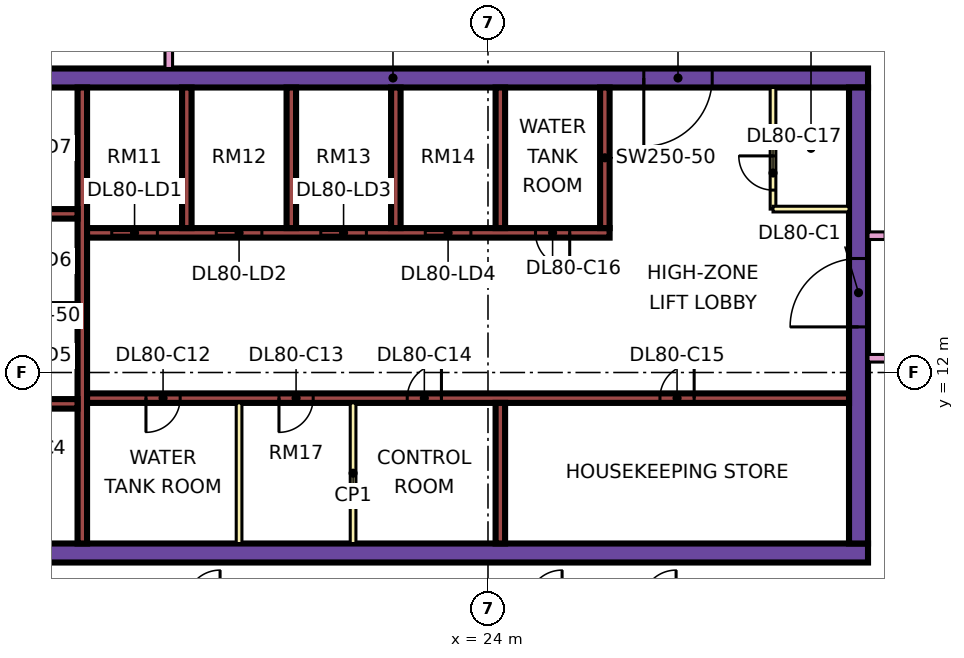
"""IFC4 building model, lengths in metres.
Left out: names, types, materials, properties, quantities, classifications, styles, units other than length and angle.
Written with IfcOpenShell. Run it as: python <this file> out.ifc"""

import sys

from ifc_helpers import new_model, si_unit, direction, frame, frame_2d, origin, place, context, subcontext, project, spatial, rectangle, extrude, element, fill, save


model = new_model("IFC4")
c1 = context("Model", 3, precision=1e-05, world=origin(), true_north=direction((0.0, 1.0)))
c2 = subcontext(c1, "Body", "Model", "MODEL_VIEW")
j1 = project(units=[si_unit("LENGTHUNIT", "METRE"), si_unit("PLANEANGLEUNIT", "RADIAN")], contexts=[c1])
p1 = place(None, origin())
s1 = spatial("IfcSite", under=j1, at=p1, CompositionType="ELEMENT")
p2 = place(p1, origin())
s2 = spatial("IfcBuilding", under=s1, at=p2, CompositionType="ELEMENT")
p3 = place(p2, frame((0.0, 0.0, 346.4)))
s3 = spatial("IfcBuildingStorey", under=s2, at=p3, CompositionType="ELEMENT", Elevation=346.4)
p4 = place(p3, frame((9.0, 7.25, 0.0), z_axis=(0.0, 0.0, 1.0), x_axis=(1.0, 0.0, 0.0)))
e1 = element("IfcWall", 1, at=p4, inside=s3, PredefinedType="SHEAR", context=c2, shape_type="SweptSolid", body=[
    extrude(rectangle(XDim=25.0, YDim=0.5, at=frame_2d((12.5, 0.0))), origin(), (0.0, 0.0, 1.0), 3.75),
])
p5 = place(p3, frame((9.0, 19.75, 0.0), z_axis=(0.0, 0.0, 1.0), x_axis=(1.0, 0.0, 0.0)))
e2 = element("IfcWall", 2, at=p5, inside=s3, PredefinedType="SHEAR", context=c2, shape_type="SweptSolid", body=[
    extrude(rectangle(XDim=25.0, YDim=0.5, at=frame_2d((12.5, 0.0))), origin(), (0.0, 0.0, 1.0), 3.75),
])
p6 = place(p5, frame((19.1, 0.0, 0.0)))
e3 = element("IfcOpeningElement", 3, at=p6, cuts=e2, PredefinedType="OPENING", context=c2, shape_type="SweptSolid", body=[
    extrude(rectangle(XDim=1.8, YDim=2.4, at=frame_2d((0.9, 1.2))), frame((0.0, 0.26, 0.0), z_axis=(0.0, -1.0, 0.0), x_axis=(1.0, 0.0, 0.0)), (0.0, 0.0, 1.0), 0.52),
])
p7 = place(p3, frame((33.75, 7.5, 0.0), z_axis=(0.0, 0.0, 1.0), x_axis=(0.0, 1.0, 0.0)))
e4 = element("IfcWall", 4, at=p7, inside=s3, PredefinedType="SHEAR", context=c2, shape_type="SweptSolid", body=[
    extrude(rectangle(XDim=12.0, YDim=0.5, at=frame_2d((6.0, 0.0))), origin(), (0.0, 0.0, 1.0), 3.75),
])
p8 = place(p7, frame((5.7, 0.0, 0.0)))
e5 = element("IfcOpeningElement", 5, at=p8, cuts=e4, PredefinedType="OPENING", context=c2, shape_type="SweptSolid", body=[
    extrude(rectangle(XDim=1.8, YDim=2.4, at=frame_2d((0.9, 1.2))), frame((0.0, 0.26, 0.0), z_axis=(0.0, -1.0, 0.0), x_axis=(1.0, 0.0, 0.0)), (0.0, 0.0, 1.0), 0.52),
])
p9 = place(p3, frame((13.325, 7.5, 0.0), z_axis=(0.0, 0.0, 1.0), x_axis=(0.0, 1.0, 0.0)))
e6 = element("IfcWall", 6, at=p9, inside=s3, PredefinedType="SHEAR", context=c2, shape_type="SweptSolid", body=[
    extrude(rectangle(XDim=12.0, YDim=0.25, at=frame_2d((6.0, 0.0))), origin(), (0.0, 0.0, 1.0), 3.75),
])
p10 = place(p3, frame((13.45, 11.325, 0.0), z_axis=(0.0, 0.0, 1.0), x_axis=(1.0, 0.0, 0.0)))
e7 = element("IfcWall", 7, at=p10, inside=s3, PredefinedType="SHEAR", context=c2, shape_type="SweptSolid", body=[
    extrude(rectangle(XDim=20.05, YDim=0.25, at=frame_2d((10.025, 0.0))), origin(), (0.0, 0.0, 1.0), 3.75),
])
p11 = place(p10, frame((1.55, 0.0, 0.0)))
e8 = element("IfcOpeningElement", 8, at=p11, cuts=e7, PredefinedType="OPENING", context=c2, shape_type="SweptSolid", body=[
    extrude(rectangle(XDim=0.9, YDim=2.1, at=frame_2d((0.45, 1.05))), frame((0.0, 0.135, 0.0), z_axis=(0.0, -1.0, 0.0), x_axis=(1.0, 0.0, 0.0)), (0.0, 0.0, 1.0), 0.27),
])
p12 = place(p10, frame((5.05, 0.0, 0.0)))
e9 = element("IfcOpeningElement", 9, at=p12, cuts=e7, PredefinedType="OPENING", context=c2, shape_type="SweptSolid", body=[
    extrude(rectangle(XDim=0.9, YDim=2.1, at=frame_2d((0.45, 1.05))), frame((0.0, 0.135, 0.0), z_axis=(0.0, -1.0, 0.0), x_axis=(1.0, 0.0, 0.0)), (0.0, 0.0, 1.0), 0.27),
])
p13 = place(p10, frame((8.425, 0.0, 0.0)))
e10 = element("IfcOpeningElement", 10, at=p13, cuts=e7, PredefinedType="OPENING", context=c2, shape_type="SweptSolid", body=[
    extrude(rectangle(XDim=0.9, YDim=2.1, at=frame_2d((0.45, 1.05))), frame((0.0, 0.135, 0.0), z_axis=(0.0, -1.0, 0.0), x_axis=(1.0, 0.0, 0.0)), (0.0, 0.0, 1.0), 0.27),
])
p14 = place(p10, frame((15.075, 0.0, 0.0)))
e11 = element("IfcOpeningElement", 11, at=p14, cuts=e7, PredefinedType="OPENING", context=c2, shape_type="SweptSolid", body=[
    extrude(rectangle(XDim=0.9, YDim=2.1, at=frame_2d((0.45, 1.05))), frame((0.0, 0.135, 0.0), z_axis=(0.0, -1.0, 0.0), x_axis=(1.0, 0.0, 0.0)), (0.0, 0.0, 1.0), 0.27),
])
p15 = place(p3, frame((13.45, 15.675, 0.0), z_axis=(0.0, 0.0, 1.0), x_axis=(1.0, 0.0, 0.0)))
e12 = element("IfcWall", 12, at=p15, inside=s3, PredefinedType="SHEAR", context=c2, shape_type="SweptSolid", body=[
    extrude(rectangle(XDim=13.75, YDim=0.25, at=frame_2d((6.875, 0.0))), origin(), (0.0, 0.0, 1.0), 3.75),
])
p16 = place(p15, frame((0.65, 0.0, 0.0)))
e13 = element("IfcOpeningElement", 13, at=p16, cuts=e12, PredefinedType="OPENING", context=c2, shape_type="SweptSolid", body=[
    extrude(rectangle(XDim=1.2, YDim=2.2, at=frame_2d((0.6, 1.1))), frame((0.0, 0.135, 0.0), z_axis=(0.0, -1.0, 0.0), x_axis=(1.0, 0.0, 0.0)), (0.0, 0.0, 1.0), 0.27),
])
p17 = place(p15, frame((3.4, 0.0, 0.0)))
e14 = element("IfcOpeningElement", 14, at=p17, cuts=e12, PredefinedType="OPENING", context=c2, shape_type="SweptSolid", body=[
    extrude(rectangle(XDim=1.2, YDim=2.2, at=frame_2d((0.6, 1.1))), frame((0.0, 0.135, 0.0), z_axis=(0.0, -1.0, 0.0), x_axis=(1.0, 0.0, 0.0)), (0.0, 0.0, 1.0), 0.27),
])
p18 = place(p15, frame((6.15, 0.0, 0.0)))
e15 = element("IfcOpeningElement", 15, at=p18, cuts=e12, PredefinedType="OPENING", context=c2, shape_type="SweptSolid", body=[
    extrude(rectangle(XDim=1.2, YDim=2.2, at=frame_2d((0.6, 1.1))), frame((0.0, 0.135, 0.0), z_axis=(0.0, -1.0, 0.0), x_axis=(1.0, 0.0, 0.0)), (0.0, 0.0, 1.0), 0.27),
])
p19 = place(p15, frame((8.9, 0.0, 0.0)))
e16 = element("IfcOpeningElement", 16, at=p19, cuts=e12, PredefinedType="OPENING", context=c2, shape_type="SweptSolid", body=[
    extrude(rectangle(XDim=1.2, YDim=2.2, at=frame_2d((0.6, 1.1))), frame((0.0, 0.135, 0.0), z_axis=(0.0, -1.0, 0.0), x_axis=(1.0, 0.0, 0.0)), (0.0, 0.0, 1.0), 0.27),
])
p20 = place(p15, frame((11.8, 0.0, 0.0)))
e17 = element("IfcOpeningElement", 17, at=p20, cuts=e12, PredefinedType="OPENING", context=c2, shape_type="SweptSolid", body=[
    extrude(rectangle(XDim=0.9, YDim=2.1, at=frame_2d((0.45, 1.05))), frame((0.0, 0.135, 0.0), z_axis=(0.0, -1.0, 0.0), x_axis=(1.0, 0.0, 0.0)), (0.0, 0.0, 1.0), 0.27),
])
for number, where, z_axis, x_axis in (
    (18, (10.2, 11.175, 0.0), (0.0, 0.0, 1.0), (1.0, 0.0, 0.0)),
    (19, (10.2, 13.675, 0.0), (0.0, 0.0, 1.0), (1.0, 0.0, 0.0)),
    (20, (10.2, 16.175, 0.0), (0.0, 0.0, 1.0), (1.0, 0.0, 0.0)),
):
    element("IfcWall", number, at=place(p3, frame(where, z_axis=z_axis, x_axis=x_axis)), inside=s3, PredefinedType="SHEAR", context=c2, shape_type="SweptSolid", body=[
        extrude(rectangle(XDim=3.0, YDim=0.25, at=frame_2d((1.5, 0.0))), origin(), (0.0, 0.0, 1.0), 3.75),
    ])
for number, where, z_axis, x_axis in (
    (21, (24.325, 7.5, 0.0), (0.0, 0.0, 1.0), (0.0, 1.0, 0.0)),
    (22, (16.075, 15.8, 0.0), (0.0, 0.0, 1.0), (0.0, 1.0, 0.0)),
    (23, (18.825, 15.8, 0.0), (0.0, 0.0, 1.0), (0.0, 1.0, 0.0)),
    (24, (21.575, 15.8, 0.0), (0.0, 0.0, 1.0), (0.0, 1.0, 0.0)),
    (25, (24.325, 15.8, 0.0), (0.0, 0.0, 1.0), (0.0, 1.0, 0.0)),
    (26, (27.075, 15.8, 0.0), (0.0, 0.0, 1.0), (0.0, 1.0, 0.0)),
):
    element("IfcWall", number, at=place(p3, frame(where, z_axis=z_axis, x_axis=x_axis)), inside=s3, PredefinedType="SHEAR", context=c2, shape_type="SweptSolid", body=[
        extrude(rectangle(XDim=3.7, YDim=0.25, at=frame_2d((1.85, 0.0))), origin(), (0.0, 0.0, 1.0), 3.75),
    ])
p21 = place(p3, frame((-1.447, 12.553, 0.0), z_axis=(0.0, 0.0, 1.0), x_axis=(0.707106781187, -0.707106781187, 0.0)))
e27 = element("IfcWall", 27, at=p21, inside=s3, PredefinedType="SOLIDWALL", context=c2, shape_type="SweptSolid", body=[
    extrude(rectangle(XDim=19.799, YDim=0.15, at=frame_2d((9.899, 0.0))), origin(), (0.0, 0.0, 1.0), 3.35),
])
p22 = place(p21, frame((2.212, 0.0, 0.45)))
e28 = element("IfcOpeningElement", 28, at=p22, cuts=e27, PredefinedType="OPENING", context=c2, shape_type="SweptSolid", body=[
    extrude(rectangle(XDim=3.0, YDim=2.4, at=frame_2d((1.5, 1.2))), frame((0.0, 0.085, 0.0), z_axis=(0.0, -1.0, 0.0), x_axis=(1.0, 0.0, 0.0)), (0.0, 0.0, 1.0), 0.17),
])
p23 = place(p21, frame((10.216, 0.0, 0.45)))
e29 = element("IfcOpeningElement", 29, at=p23, cuts=e27, PredefinedType="OPENING", context=c2, shape_type="SweptSolid", body=[
    extrude(rectangle(XDim=3.0, YDim=2.4, at=frame_2d((1.5, 1.2))), frame((0.0, 0.085, 0.0), z_axis=(0.0, -1.0, 0.0), x_axis=(1.0, 0.0, 0.0)), (0.0, 0.0, 1.0), 0.17),
])
for number, where, z_axis, x_axis in (
    (30, (17.45, 7.5, 0.0), (0.0, 0.0, 1.0), (0.0, 1.0, 0.0)),
    (31, (20.45, 7.5, 0.0), (0.0, 0.0, 1.0), (0.0, 1.0, 0.0)),
):
    element("IfcWall", number, at=place(p3, frame(where, z_axis=z_axis, x_axis=x_axis)), inside=s3, PredefinedType="PARTITIONING", context=c2, shape_type="SweptSolid", body=[
        extrude(rectangle(XDim=3.7, YDim=0.15, at=frame_2d((1.85, 0.0))), origin(), (0.0, 0.0, 1.0), 3.35),
    ])
p24 = place(p3, frame((31.5, 16.3, 0.0), z_axis=(0.0, 0.0, 1.0), x_axis=(0.0, 1.0, 0.0)))
e32 = element("IfcWall", 32, at=p24, inside=s3, PredefinedType="PARTITIONING", context=c2, shape_type="SweptSolid", body=[
    extrude(rectangle(XDim=3.2, YDim=0.15, at=frame_2d((1.6, 0.0))), origin(), (0.0, 0.0, 1.0), 3.35),
])
p25 = place(p24, frame((0.5, 0.0, 0.0)))
e33 = element("IfcOpeningElement", 33, at=p25, cuts=e32, PredefinedType="OPENING", context=c2, shape_type="SweptSolid", body=[
    extrude(rectangle(XDim=0.9, YDim=2.1, at=frame_2d((0.45, 1.05))), frame((0.0, 0.085, 0.0), z_axis=(0.0, -1.0, 0.0), x_axis=(1.0, 0.0, 0.0)), (0.0, 0.0, 1.0), 0.17),
])
p26 = place(p3, frame((31.5, 16.3, 0.0), z_axis=(0.0, 0.0, 1.0), x_axis=(1.0, 0.0, 0.0)))
e34 = element("IfcWall", 34, at=p26, inside=s3, PredefinedType="PARTITIONING", context=c2, shape_type="SweptSolid", body=[
    extrude(rectangle(XDim=2.0, YDim=0.15, at=frame_2d((1.0, 0.0))), origin(), (0.0, 0.0, 1.0), 3.35),
])
p27 = place(p3, frame((15.6, 20.0, 0.0), z_axis=(0.0, 0.0, 1.0), x_axis=(0.0, 1.0, 0.0)))
e35 = element("IfcWall", 35, at=p27, inside=s3, PredefinedType="PARTITIONING", context=c2, shape_type="SweptSolid", body=[
    extrude(rectangle(XDim=27.775, YDim=0.2, at=frame_2d((13.887, 0.0))), origin(), (0.0, 0.0, 1.0), 3.35),
])
p28 = place(p27, frame((6.7, 0.0, 0.0)))
e36 = element("IfcOpeningElement", 36, at=p28, cuts=e35, PredefinedType="OPENING", context=c2, shape_type="SweptSolid", body=[
    extrude(rectangle(XDim=1.6, YDim=2.1, at=frame_2d((0.8, 1.05))), frame((0.0, 0.11, 0.0), z_axis=(0.0, -1.0, 0.0), x_axis=(1.0, 0.0, 0.0)), (0.0, 0.0, 1.0), 0.22),
])
p29 = place(p27, frame((12.95, 0.0, 0.0)))
e37 = element("IfcOpeningElement", 37, at=p29, cuts=e35, PredefinedType="OPENING", context=c2, shape_type="SweptSolid", body=[
    extrude(rectangle(XDim=1.0, YDim=2.1, at=frame_2d((0.5, 1.05))), frame((0.0, 0.11, 0.0), z_axis=(0.0, -1.0, 0.0), x_axis=(1.0, 0.0, 0.0)), (0.0, 0.0, 1.0), 0.22),
])
p30 = place(p27, frame((16.9, 0.0, 0.0)))
e38 = element("IfcOpeningElement", 38, at=p30, cuts=e35, PredefinedType="OPENING", context=c2, shape_type="SweptSolid", body=[
    extrude(rectangle(XDim=1.0, YDim=2.1, at=frame_2d((0.5, 1.05))), frame((0.0, 0.11, 0.0), z_axis=(0.0, -1.0, 0.0), x_axis=(1.0, 0.0, 0.0)), (0.0, 0.0, 1.0), 0.22),
])
p31 = place(p27, frame((1.15, 0.0, 0.0)))
e39 = element("IfcOpeningElement", 39, at=p31, cuts=e35, PredefinedType="OPENING", context=c2, shape_type="SweptSolid", body=[
    extrude(rectangle(XDim=1.8, YDim=2.1, at=frame_2d((0.9, 1.05))), frame((0.0, 0.11, 0.0), z_axis=(0.0, -1.0, 0.0), x_axis=(1.0, 0.0, 0.0)), (0.0, 0.0, 1.0), 0.22),
])
p32 = place(p27, frame((25.9, 0.0, 0.0)))
e40 = element("IfcOpeningElement", 40, at=p32, cuts=e35, PredefinedType="OPENING", context=c2, shape_type="SweptSolid", body=[
    extrude(rectangle(XDim=1.0, YDim=2.1, at=frame_2d((0.5, 1.05))), frame((0.0, 0.11, 0.0), z_axis=(0.0, -1.0, 0.0), x_axis=(1.0, 0.0, 0.0)), (0.0, 0.0, 1.0), 0.22),
])
p33 = place(p3, frame((34.0, 12.375, 0.0), z_axis=(0.0, 0.0, 1.0), x_axis=(1.0, 0.0, 0.0)))
e41 = element("IfcWall", 41, at=p33, inside=s3, PredefinedType="PARTITIONING", context=c2, shape_type="SweptSolid", body=[
    extrude(rectangle(XDim=2.376, YDim=0.2, at=frame_2d((1.188, 0.0))), origin(), (0.0, 0.0, 1.0), 3.35),
])
p34 = place(p3, frame((34.0, 15.6, 0.0), z_axis=(0.0, 0.0, 1.0), x_axis=(1.0, 0.0, 0.0)))
e42 = element("IfcWall", 42, at=p34, inside=s3, PredefinedType="PARTITIONING", context=c2, shape_type="SweptSolid", body=[
    extrude(rectangle(XDim=10.35, YDim=0.2, at=frame_2d((5.175, 0.0))), origin(), (0.0, 0.0, 1.0), 3.35),
])
p35 = place(p34, frame((5.6, 0.0, 0.0)))
e43 = element("IfcOpeningElement", 43, at=p35, cuts=e42, PredefinedType="OPENING", context=c2, shape_type="SweptSolid", body=[
    extrude(rectangle(XDim=1.0, YDim=2.1, at=frame_2d((0.5, 1.05))), frame((0.0, 0.11, 0.0), z_axis=(0.0, -1.0, 0.0), x_axis=(1.0, 0.0, 0.0)), (0.0, 0.0, 1.0), 0.22),
])
p36 = place(p34, frame((0.45, 0.0, 0.0)))
e44 = element("IfcOpeningElement", 44, at=p36, cuts=e42, PredefinedType="OPENING", context=c2, shape_type="SweptSolid", body=[
    extrude(rectangle(XDim=1.2, YDim=2.1, at=frame_2d((0.6, 1.05))), frame((0.0, 0.11, 0.0), z_axis=(0.0, -1.0, 0.0), x_axis=(1.0, 0.0, 0.0)), (0.0, 0.0, 1.0), 0.22),
])
p37 = place(p16, origin())
e45 = element("IfcDoor", 45, at=p37, inside=s3, OperationType="DOUBLE_DOOR_SLIDING", PredefinedType="DOOR", context=c2, shape_type="SweptSolid", body=[
    extrude(rectangle(XDim=1.2, YDim=2.2, at=frame_2d((0.6, 1.1))), frame((0.0, 0.025, 0.0), z_axis=(0.0, -1.0, 0.0), x_axis=(1.0, 0.0, 0.0)), (0.0, 0.0, 1.0), 0.05),
])
fill(e13, e45)
p38 = place(p17, origin())
e46 = element("IfcDoor", 46, at=p38, inside=s3, OperationType="DOUBLE_DOOR_SLIDING", PredefinedType="DOOR", context=c2, shape_type="SweptSolid", body=[
    extrude(rectangle(XDim=1.2, YDim=2.2, at=frame_2d((0.6, 1.1))), frame((0.0, 0.025, 0.0), z_axis=(0.0, -1.0, 0.0), x_axis=(1.0, 0.0, 0.0)), (0.0, 0.0, 1.0), 0.05),
])
fill(e14, e46)
p39 = place(p18, origin())
e47 = element("IfcDoor", 47, at=p39, inside=s3, OperationType="DOUBLE_DOOR_SLIDING", PredefinedType="DOOR", context=c2, shape_type="SweptSolid", body=[
    extrude(rectangle(XDim=1.2, YDim=2.2, at=frame_2d((0.6, 1.1))), frame((0.0, 0.025, 0.0), z_axis=(0.0, -1.0, 0.0), x_axis=(1.0, 0.0, 0.0)), (0.0, 0.0, 1.0), 0.05),
])
fill(e15, e47)
p40 = place(p19, origin())
e48 = element("IfcDoor", 48, at=p40, inside=s3, OperationType="DOUBLE_DOOR_SLIDING", PredefinedType="DOOR", context=c2, shape_type="SweptSolid", body=[
    extrude(rectangle(XDim=1.2, YDim=2.2, at=frame_2d((0.6, 1.1))), frame((0.0, 0.025, 0.0), z_axis=(0.0, -1.0, 0.0), x_axis=(1.0, 0.0, 0.0)), (0.0, 0.0, 1.0), 0.05),
])
fill(e16, e48)
p41 = place(p8, origin())
e49 = element("IfcDoor", 49, at=p41, inside=s3, OperationType="DOUBLE_DOOR_SINGLE_SWING", PredefinedType="DOOR", context=c2, shape_type="SweptSolid", body=[
    extrude(rectangle(XDim=1.8, YDim=2.4, at=frame_2d((0.9, 1.2))), frame((0.0, 0.025, 0.0), z_axis=(0.0, -1.0, 0.0), x_axis=(1.0, 0.0, 0.0)), (0.0, 0.0, 1.0), 0.05),
])
fill(e5, e49)
p42 = place(p6, frame((1.8, 0.0, 0.0), z_axis=(0.0, 0.0, 1.0), x_axis=(-1.0, 0.0, 0.0)))
e50 = element("IfcDoor", 50, at=p42, inside=s3, OperationType="DOUBLE_DOOR_SINGLE_SWING", PredefinedType="DOOR", context=c2, shape_type="SweptSolid", body=[
    extrude(rectangle(XDim=1.8, YDim=2.4, at=frame_2d((0.9, 1.2))), frame((0.0, 0.025, 0.0), z_axis=(0.0, -1.0, 0.0), x_axis=(1.0, 0.0, 0.0)), (0.0, 0.0, 1.0), 0.05),
])
fill(e3, e50)
p43 = place(p11, frame((0.9, 0.0, 0.0), z_axis=(0.0, 0.0, 1.0), x_axis=(-1.0, 0.0, 0.0)))
e51 = element("IfcDoor", 51, at=p43, inside=s3, OperationType="SINGLE_SWING_LEFT", PredefinedType="DOOR", context=c2, shape_type="SweptSolid", body=[
    extrude(rectangle(XDim=0.9, YDim=2.1, at=frame_2d((0.45, 1.05))), frame((0.0, 0.025, 0.0), z_axis=(0.0, -1.0, 0.0), x_axis=(1.0, 0.0, 0.0)), (0.0, 0.0, 1.0), 0.05),
])
fill(e8, e51)
p44 = place(p12, frame((0.9, 0.0, 0.0), z_axis=(0.0, 0.0, 1.0), x_axis=(-1.0, 0.0, 0.0)))
e52 = element("IfcDoor", 52, at=p44, inside=s3, OperationType="SINGLE_SWING_LEFT", PredefinedType="DOOR", context=c2, shape_type="SweptSolid", body=[
    extrude(rectangle(XDim=0.9, YDim=2.1, at=frame_2d((0.45, 1.05))), frame((0.0, 0.025, 0.0), z_axis=(0.0, -1.0, 0.0), x_axis=(1.0, 0.0, 0.0)), (0.0, 0.0, 1.0), 0.05),
])
fill(e9, e52)
p45 = place(p13, frame((0.9, 0.0, 0.0), z_axis=(0.0, 0.0, 1.0), x_axis=(-1.0, 0.0, 0.0)))
e53 = element("IfcDoor", 53, at=p45, inside=s3, OperationType="SINGLE_SWING_RIGHT", PredefinedType="DOOR", context=c2, shape_type="SweptSolid", body=[
    extrude(rectangle(XDim=0.9, YDim=2.1, at=frame_2d((0.45, 1.05))), frame((0.0, 0.025, 0.0), z_axis=(0.0, -1.0, 0.0), x_axis=(1.0, 0.0, 0.0)), (0.0, 0.0, 1.0), 0.05),
])
fill(e10, e53)
p46 = place(p14, frame((0.9, 0.0, 0.0), z_axis=(0.0, 0.0, 1.0), x_axis=(-1.0, 0.0, 0.0)))
e54 = element("IfcDoor", 54, at=p46, inside=s3, OperationType="SINGLE_SWING_RIGHT", PredefinedType="DOOR", context=c2, shape_type="SweptSolid", body=[
    extrude(rectangle(XDim=0.9, YDim=2.1, at=frame_2d((0.45, 1.05))), frame((0.0, 0.025, 0.0), z_axis=(0.0, -1.0, 0.0), x_axis=(1.0, 0.0, 0.0)), (0.0, 0.0, 1.0), 0.05),
])
fill(e11, e54)
p47 = place(p20, origin())
e55 = element("IfcDoor", 55, at=p47, inside=s3, OperationType="SINGLE_SWING_RIGHT", PredefinedType="DOOR", context=c2, shape_type="SweptSolid", body=[
    extrude(rectangle(XDim=0.9, YDim=2.1, at=frame_2d((0.45, 1.05))), frame((0.0, 0.025, 0.0), z_axis=(0.0, -1.0, 0.0), x_axis=(1.0, 0.0, 0.0)), (0.0, 0.0, 1.0), 0.05),
])
fill(e17, e55)
p48 = place(p25, frame((0.9, 0.0, 0.0), z_axis=(0.0, 0.0, 1.0), x_axis=(-1.0, 0.0, 0.0)))
e56 = element("IfcDoor", 56, at=p48, inside=s3, OperationType="SINGLE_SWING_RIGHT", PredefinedType="DOOR", context=c2, shape_type="SweptSolid", body=[
    extrude(rectangle(XDim=0.9, YDim=2.1, at=frame_2d((0.45, 1.05))), frame((0.0, 0.025, 0.0), z_axis=(0.0, -1.0, 0.0), x_axis=(1.0, 0.0, 0.0)), (0.0, 0.0, 1.0), 0.05),
])
fill(e33, e56)
save(model, sys.argv[1])
